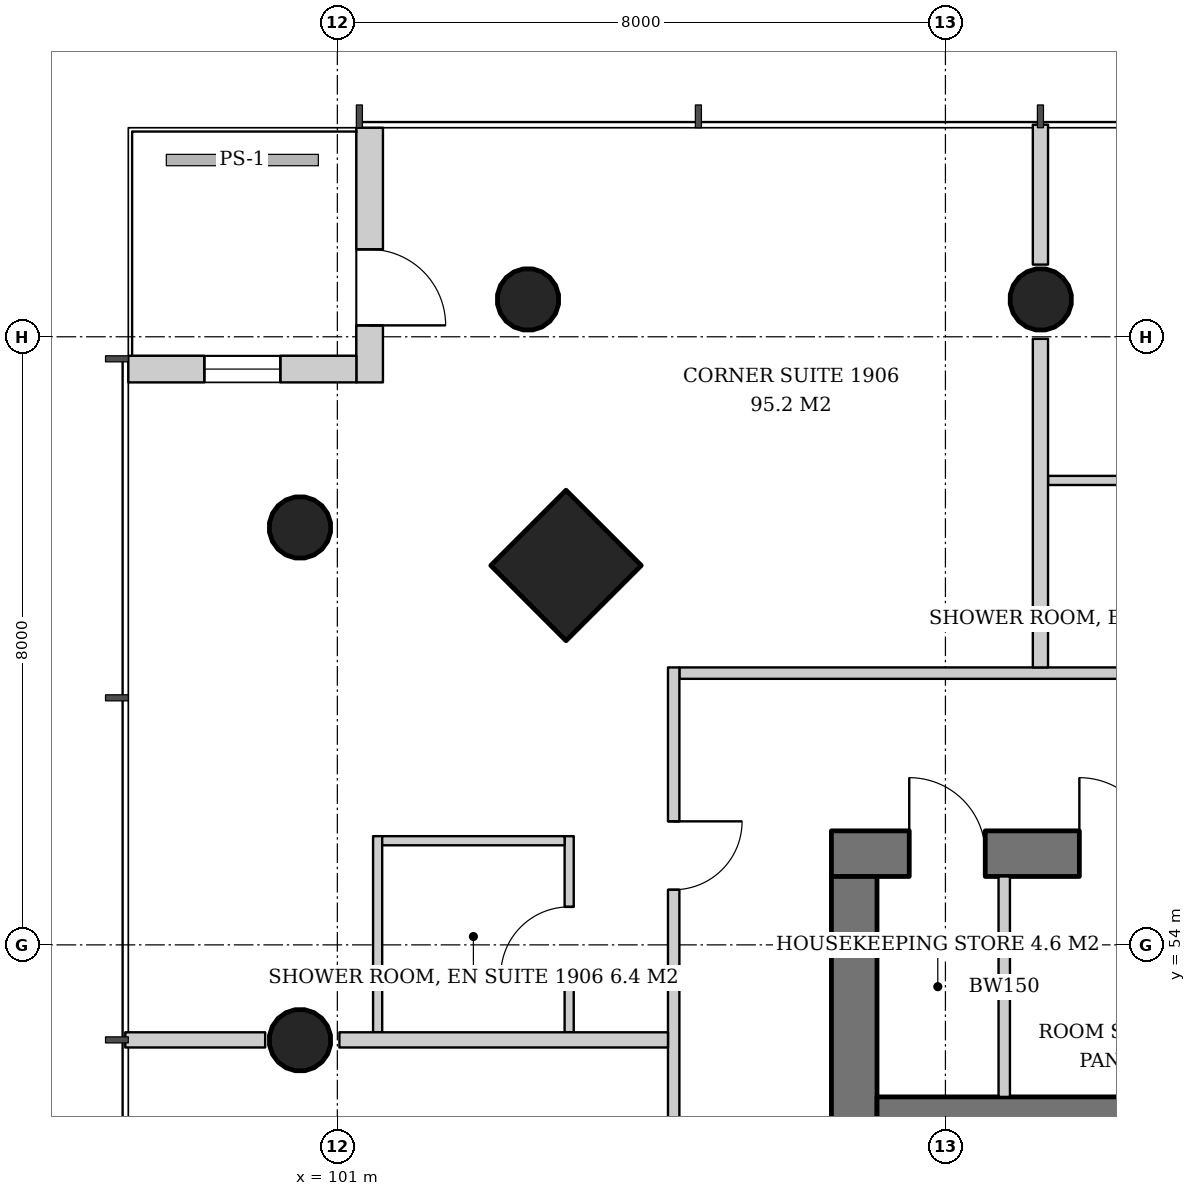
"""IFC4 building model, lengths in metres.
Left out: names, types, materials, properties, quantities, classifications, styles, units other than length and angle.
Written with IfcOpenShell. Run it as: python <this file> out.ifc"""

import sys

from ifc_helpers import new_model, si_unit, direction, frame, frame_2d, origin, origin_2d, place, context, subcontext, project, spatial, rectangle, hollow_circle, extrude, element, fill, save


model = new_model("IFC4")
c1 = context("Model", 3, precision=1e-05, world=origin(), true_north=direction((0.0, 1.0)))
c2 = subcontext(c1, "Body", "Model", "MODEL_VIEW")
j1 = project(units=[si_unit("LENGTHUNIT", "METRE"), si_unit("PLANEANGLEUNIT", "RADIAN")], contexts=[c1])
p1 = place(None, origin())
s1 = spatial("IfcSite", under=j1, at=p1, CompositionType="ELEMENT")
p2 = place(p1, origin())
s2 = spatial("IfcBuilding", under=s1, at=p2, CompositionType="ELEMENT")
p3 = place(p2, frame((0.0, 0.0, 78.0)))
s3 = spatial("IfcBuildingStorey", under=s2, at=p3, CompositionType="ELEMENT", Elevation=78.0)
p4 = place(p3, frame((103.957, 59.043, 0.0), z_axis=(0.043029647111, -0.043029647111, 0.998146732169), x_axis=(0.707106781187, 0.707106781187, 0.0)))
e1 = element("IfcColumn", 1, at=p4, inside=s3, PredefinedType="COLUMN", context=c2, shape_type="SweptSolid", body=[
    extrude(rectangle(XDim=1.4, YDim=1.4, at=origin_2d()), origin(), (0.0, 0.0, 1.0), 3.807),
])
p5 = place(p3, frame((103.457, 62.543, 0.0), z_axis=(0.043029647111, -0.043029647111, 0.998146732169), x_axis=(0.707106781187, 0.707106781187, 0.0)))
e2 = element("IfcColumn", 2, at=p5, inside=s3, PredefinedType="COLUMN", context=c2, shape_type="SweptSolid", body=[
    extrude(hollow_circle(Radius=0.406, WallThickness=0.03, at=origin_2d()), origin(), (0.0, 0.0, 1.0), 3.807),
])
p6 = place(p3, frame((110.229, 62.543, 0.0), z_axis=(0.021497706284, -0.043059584825, 0.998841188968), x_axis=(0.894693706707, 0.446680166538, 0.0)))
e3 = element("IfcColumn", 3, at=p6, inside=s3, PredefinedType="COLUMN", context=c2, shape_type="SweptSolid", body=[
    extrude(hollow_circle(Radius=0.406, WallThickness=0.03, at=origin_2d()), origin(), (0.0, 0.0, 1.0), 3.804),
])
p7 = place(p3, frame((100.457, 59.543, 0.0), z_axis=(0.043029647111, -0.043029647111, 0.998146732169), x_axis=(0.707106781187, 0.707106781187, 0.0)))
e4 = element("IfcColumn", 4, at=p7, inside=s3, PredefinedType="COLUMN", context=c2, shape_type="SweptSolid", body=[
    extrude(hollow_circle(Radius=0.406, WallThickness=0.03, at=origin_2d()), origin(), (0.0, 0.0, 1.0), 3.807),
])
p8 = place(p3, frame((100.457, 52.771, 0.0), z_axis=(0.043059584825, -0.021497706284, 0.998841188968), x_axis=(0.446680166538, 0.894693706707, 0.0)))
e5 = element("IfcColumn", 5, at=p8, inside=s3, PredefinedType="COLUMN", context=c2, shape_type="SweptSolid", body=[
    extrude(hollow_circle(Radius=0.406, WallThickness=0.03, at=origin_2d()), origin(), (0.0, 0.0, 1.0), 3.804),
])
p9 = place(p3, frame((107.5, 55.2, 0.0), z_axis=(0.0, 0.0, 1.0), x_axis=(1.0, 0.0, 0.0)))
e6 = element("IfcWall", 6, at=p9, inside=s3, PredefinedType="SHEAR", context=c2, shape_type="SweptSolid", body=[
    extrude(rectangle(XDim=19.0, YDim=0.6, at=frame_2d((9.5, 0.0))), origin(), (0.0, 0.0, 1.0), 3.8),
])
p10 = place(p9, frame((14.14, 0.0, 0.0)))
e7 = element("IfcOpeningElement", 7, at=p10, cuts=e6, PredefinedType="OPENING", context=c2, shape_type="SweptSolid", body=[
    extrude(rectangle(XDim=1.0, YDim=2.1, at=frame_2d((0.5, 1.05))), frame((0.0, 0.31, 0.0), z_axis=(0.0, -1.0, 0.0), x_axis=(1.0, 0.0, 0.0)), (0.0, 0.0, 1.0), 0.62),
])
p11 = place(p9, frame((1.024, 0.0, 0.0)))
e8 = element("IfcOpeningElement", 8, at=p11, cuts=e6, PredefinedType="OPENING", context=c2, shape_type="SweptSolid", body=[
    extrude(rectangle(XDim=1.0, YDim=2.1, at=frame_2d((0.5, 1.05))), frame((0.0, 0.31, 0.0), z_axis=(0.0, -1.0, 0.0), x_axis=(1.0, 0.0, 0.0)), (0.0, 0.0, 1.0), 0.62),
])
p12 = place(p9, frame((3.262, 0.0, 0.0)))
e9 = element("IfcOpeningElement", 9, at=p12, cuts=e6, PredefinedType="OPENING", context=c2, shape_type="SweptSolid", body=[
    extrude(rectangle(XDim=1.0, YDim=2.1, at=frame_2d((0.5, 1.05))), frame((0.0, 0.31, 0.0), z_axis=(0.0, -1.0, 0.0), x_axis=(1.0, 0.0, 0.0)), (0.0, 0.0, 1.0), 0.62),
])
p13 = place(p3, frame((107.8, 37.1, 0.0), z_axis=(0.0, 0.0, 1.0), x_axis=(0.0, 1.0, 0.0)))
e10 = element("IfcWall", 10, at=p13, inside=s3, PredefinedType="SHEAR", context=c2, shape_type="SweptSolid", body=[
    extrude(rectangle(XDim=17.8, YDim=0.6, at=frame_2d((8.9, 0.0))), origin(), (0.0, 0.0, 1.0), 3.8),
])
p14 = place(p13, frame((8.0, 0.0, 0.0)))
e11 = element("IfcOpeningElement", 11, at=p14, cuts=e10, PredefinedType="OPENING", context=c2, shape_type="SweptSolid", body=[
    extrude(rectangle(XDim=1.8, YDim=2.4, at=frame_2d((0.9, 1.2))), frame((0.0, 0.31, 0.0), z_axis=(0.0, -1.0, 0.0), x_axis=(1.0, 0.0, 0.0)), (0.0, 0.0, 1.0), 0.62),
])
p15 = place(p3, frame((108.1, 51.8, 0.0), z_axis=(0.0, 0.0, 1.0), x_axis=(1.0, 0.0, 0.0)))
e12 = element("IfcWall", 12, at=p15, inside=s3, PredefinedType="SHEAR", context=c2, shape_type="SweptSolid", body=[
    extrude(rectangle(XDim=17.8, YDim=0.4, at=frame_2d((8.9, 0.0))), origin(), (0.0, 0.0, 1.0), 3.8),
])
p16 = place(p3, frame((101.425, 64.75, 0.0), z_axis=(0.0, 0.0, 1.0), x_axis=(0.0, -1.0, 0.0)))
e13 = element("IfcWall", 13, at=p16, inside=s3, PredefinedType="SOLIDWALL", context=c2, shape_type="SweptSolid", body=[
    extrude(rectangle(XDim=3.35, YDim=0.35, at=frame_2d((1.675, 0.0))), origin(), (0.0, 0.0, 1.0), 3.52),
])
p17 = place(p16, frame((1.6, 0.0, 0.0)))
e14 = element("IfcOpeningElement", 14, at=p17, cuts=e13, PredefinedType="OPENING", context=c2, shape_type="SweptSolid", body=[
    extrude(rectangle(XDim=1.0, YDim=2.4, at=frame_2d((0.5, 1.2))), frame((0.0, 0.185, 0.0), z_axis=(0.0, -1.0, 0.0), x_axis=(1.0, 0.0, 0.0)), (0.0, 0.0, 1.0), 0.37),
])
p18 = place(p3, frame((101.25, 61.575, 0.0), z_axis=(0.0, 0.0, 1.0), x_axis=(-1.0, 0.0, 0.0)))
e15 = element("IfcWall", 15, at=p18, inside=s3, PredefinedType="SOLIDWALL", context=c2, shape_type="SweptSolid", body=[
    extrude(rectangle(XDim=3.0, YDim=0.35, at=frame_2d((1.5, 0.0))), origin(), (0.0, 0.0, 1.0), 3.52),
])
p19 = place(p18, frame((1.0, 0.0, 0.82)))
e16 = element("IfcOpeningElement", 16, at=p19, cuts=e15, PredefinedType="OPENING", context=c2, shape_type="SweptSolid", body=[
    extrude(rectangle(XDim=1.0, YDim=2.4, at=frame_2d((0.5, 1.2))), frame((0.0, 0.185, 0.0), z_axis=(0.0, -1.0, 0.0), x_axis=(1.0, 0.0, 0.0)), (0.0, 0.0, 1.0), 0.37),
])
p20 = place(p3, frame((109.774, 52.0, 0.0), z_axis=(0.0, 0.0, 1.0), x_axis=(0.0, 1.0, 0.0)))
e17 = element("IfcWall", 17, at=p20, inside=s3, PredefinedType="SOLIDWALL", context=c2, shape_type="SweptSolid", body=[
    extrude(rectangle(XDim=2.9, YDim=0.15, at=frame_2d((1.45, 0.0))), origin(), (0.0, 0.0, 1.0), 3.52),
])
p21 = place(p3, frame((112.77, 60.11, 0.0), z_axis=(0.0, 0.0, 1.0), x_axis=(-1.0, 0.0, 0.0)))
e18 = element("IfcWall", 18, at=p21, inside=s3, PredefinedType="PARTITIONING", context=c2, shape_type="SweptSolid", body=[
    extrude(rectangle(XDim=2.42, YDim=0.12, at=frame_2d((1.21, 0.0))), origin(), (0.0, 0.0, 1.0), 3.52),
])
p22 = place(p3, frame((128.65, 57.575, 0.0), z_axis=(0.0, 0.0, 1.0), x_axis=(-1.0, 0.0, 0.0)))
e19 = element("IfcWall", 19, at=p22, inside=s3, PredefinedType="PARTITIONING", context=c2, shape_type="SweptSolid", body=[
    extrude(rectangle(XDim=23.15, YDim=0.15, at=frame_2d((11.575, 0.0))), origin(), (0.0, 0.0, 1.0), 2.72),
])
p23 = place(p22, frame((2.025, 0.0, 0.0)))
e20 = element("IfcOpeningElement", 20, at=p23, cuts=e19, PredefinedType="OPENING", context=c2, shape_type="SweptSolid", body=[
    extrude(rectangle(XDim=0.9, YDim=2.1, at=frame_2d((0.45, 1.05))), frame((0.0, 0.085, 0.0), z_axis=(0.0, -1.0, 0.0), x_axis=(1.0, 0.0, 0.0)), (0.0, 0.0, 1.0), 0.17),
])
p24 = place(p22, frame((7.65, 0.0, 0.0)))
e21 = element("IfcOpeningElement", 21, at=p24, cuts=e19, PredefinedType="OPENING", context=c2, shape_type="SweptSolid", body=[
    extrude(rectangle(XDim=0.9, YDim=2.1, at=frame_2d((0.45, 1.05))), frame((0.0, 0.085, 0.0), z_axis=(0.0, -1.0, 0.0), x_axis=(1.0, 0.0, 0.0)), (0.0, 0.0, 1.0), 0.17),
])
p25 = place(p22, frame((14.75, 0.0, 0.0)))
e22 = element("IfcOpeningElement", 22, at=p25, cuts=e19, PredefinedType="OPENING", context=c2, shape_type="SweptSolid", body=[
    extrude(rectangle(XDim=0.9, YDim=2.1, at=frame_2d((0.45, 1.05))), frame((0.0, 0.085, 0.0), z_axis=(0.0, -1.0, 0.0), x_axis=(1.0, 0.0, 0.0)), (0.0, 0.0, 1.0), 0.17),
])
p26 = place(p3, frame((110.25, 57.65, 0.0), z_axis=(0.0, 0.0, 1.0), x_axis=(0.0, 1.0, 0.0)))
e23 = element("IfcWall", 23, at=p26, inside=s3, PredefinedType="PARTITIONING", context=c2, shape_type="SweptSolid", body=[
    extrude(rectangle(XDim=4.323, YDim=0.2, at=frame_2d((2.162, 0.0))), origin(), (0.0, 0.0, 1.0), 3.52),
])
p27 = place(p3, frame((110.25, 62.95, 0.0), z_axis=(0.0, 0.0, 1.0), x_axis=(0.0, 1.0, 0.0)))
e24 = element("IfcWall", 24, at=p27, inside=s3, PredefinedType="PARTITIONING", context=c2, shape_type="SweptSolid", body=[
    extrude(rectangle(XDim=1.84, YDim=0.2, at=frame_2d((0.92, 0.0))), origin(), (0.0, 0.0, 1.0), 3.52),
])
p28 = place(p3, frame((104.05, 52.85, 0.0), z_axis=(0.0, 0.0, 1.0), x_axis=(0.0, 1.0, 0.0)))
e25 = element("IfcWall", 25, at=p28, inside=s3, PredefinedType="PARTITIONING", context=c2, shape_type="SweptSolid", body=[
    extrude(rectangle(XDim=2.58, YDim=0.12, at=frame_2d((1.29, 0.0))), origin(), (0.0, 0.0, 1.0), 2.82),
])
p29 = place(p28, frame((0.75, 0.0, 0.0)))
e26 = element("IfcOpeningElement", 26, at=p29, cuts=e25, PredefinedType="OPENING", context=c2, shape_type="SweptSolid", body=[
    extrude(rectangle(XDim=0.9, YDim=2.1, at=frame_2d((0.45, 1.05))), frame((0.0, 0.07, 0.0), z_axis=(0.0, -1.0, 0.0), x_axis=(1.0, 0.0, 0.0)), (0.0, 0.0, 1.0), 0.14),
])
p30 = place(p3, frame((101.53, 52.85, 0.0), z_axis=(0.0, 0.0, 1.0), x_axis=(0.0, 1.0, 0.0)))
e27 = element("IfcWall", 27, at=p30, inside=s3, PredefinedType="PARTITIONING", context=c2, shape_type="SweptSolid", body=[
    extrude(rectangle(XDim=2.58, YDim=0.12, at=frame_2d((1.29, 0.0))), origin(), (0.0, 0.0, 1.0), 2.82),
])
p31 = place(p3, frame((103.99, 55.37, 0.0), z_axis=(0.0, 0.0, 1.0), x_axis=(-1.0, 0.0, 0.0)))
e28 = element("IfcWall", 28, at=p31, inside=s3, PredefinedType="PARTITIONING", context=c2, shape_type="SweptSolid", body=[
    extrude(rectangle(XDim=2.4, YDim=0.12, at=frame_2d((1.2, 0.0))), origin(), (0.0, 0.0, 1.0), 2.82),
])
p32 = place(p3, frame((105.425, 57.65, 0.0), z_axis=(0.0, 0.0, 1.0), x_axis=(0.0, -1.0, 0.0)))
e29 = element("IfcWall", 29, at=p32, inside=s3, PredefinedType="PARTITIONING", context=c2, shape_type="SweptSolid", body=[
    extrude(rectangle(XDim=23.15, YDim=0.15, at=frame_2d((11.575, 0.0))), origin(), (0.0, 0.0, 1.0), 2.72),
])
p33 = place(p32, frame((2.025, 0.0, 0.0)))
e30 = element("IfcOpeningElement", 30, at=p33, cuts=e29, PredefinedType="OPENING", context=c2, shape_type="SweptSolid", body=[
    extrude(rectangle(XDim=0.9, YDim=2.1, at=frame_2d((0.45, 1.05))), frame((0.0, 0.085, 0.0), z_axis=(0.0, -1.0, 0.0), x_axis=(1.0, 0.0, 0.0)), (0.0, 0.0, 1.0), 0.17),
])
p34 = place(p32, frame((7.6, 0.0, 0.0)))
e31 = element("IfcOpeningElement", 31, at=p34, cuts=e29, PredefinedType="OPENING", context=c2, shape_type="SweptSolid", body=[
    extrude(rectangle(XDim=1.0, YDim=2.1, at=frame_2d((0.5, 1.05))), frame((0.0, 0.085, 0.0), z_axis=(0.0, -1.0, 0.0), x_axis=(1.0, 0.0, 0.0)), (0.0, 0.0, 1.0), 0.17),
])
p35 = place(p32, frame((10.25, 0.0, 0.0)))
e32 = element("IfcOpeningElement", 32, at=p35, cuts=e29, PredefinedType="OPENING", context=c2, shape_type="SweptSolid", body=[
    extrude(rectangle(XDim=0.9, YDim=2.1, at=frame_2d((0.45, 1.05))), frame((0.0, 0.085, 0.0), z_axis=(0.0, -1.0, 0.0), x_axis=(1.0, 0.0, 0.0)), (0.0, 0.0, 1.0), 0.17),
])
p36 = place(p32, frame((16.65, 0.0, 0.0)))
e33 = element("IfcOpeningElement", 33, at=p36, cuts=e29, PredefinedType="OPENING", context=c2, shape_type="SweptSolid", body=[
    extrude(rectangle(XDim=0.9, YDim=2.1, at=frame_2d((0.45, 1.05))), frame((0.0, 0.085, 0.0), z_axis=(0.0, -1.0, 0.0), x_axis=(1.0, 0.0, 0.0)), (0.0, 0.0, 1.0), 0.17),
])
p37 = place(p3, frame((105.35, 52.75, 0.0), z_axis=(0.0, 0.0, 1.0), x_axis=(-1.0, 0.0, 0.0)))
e34 = element("IfcWall", 34, at=p37, inside=s3, PredefinedType="PARTITIONING", context=c2, shape_type="SweptSolid", body=[
    extrude(rectangle(XDim=4.323, YDim=0.2, at=frame_2d((2.162, 0.0))), origin(), (0.0, 0.0, 1.0), 3.52),
])
p38 = place(p3, frame((100.05, 52.75, 0.0), z_axis=(0.0, 0.0, 1.0), x_axis=(-1.0, 0.0, 0.0)))
e35 = element("IfcWall", 35, at=p38, inside=s3, PredefinedType="PARTITIONING", context=c2, shape_type="SweptSolid", body=[
    extrude(rectangle(XDim=1.84, YDim=0.2, at=frame_2d((0.92, 0.0))), origin(), (0.0, 0.0, 1.0), 3.52),
])
p39 = place(p17, origin())
e36 = element("IfcDoor", 36, at=p39, inside=s3, OperationType="SINGLE_SWING_RIGHT", PredefinedType="DOOR", context=c2, shape_type="SweptSolid", body=[
    extrude(rectangle(XDim=1.0, YDim=2.4, at=frame_2d((0.5, 1.2))), frame((0.0, 0.025, 0.0), z_axis=(0.0, -1.0, 0.0), x_axis=(1.0, 0.0, 0.0)), (0.0, 0.0, 1.0), 0.05),
])
fill(e14, e36)
p40 = place(p19, origin())
e37 = element("IfcWindow", 37, at=p40, inside=s3, PartitioningType="SINGLE_PANEL", PredefinedType="WINDOW", context=c2, shape_type="SweptSolid", body=[
    extrude(rectangle(XDim=1.0, YDim=2.4, at=frame_2d((0.5, 1.2))), frame((0.0, 0.03, 0.0), z_axis=(0.0, -1.0, 0.0), x_axis=(1.0, 0.0, 0.0)), (0.0, 0.0, 1.0), 0.06),
])
fill(e16, e37)
p41 = place(p11, origin())
e38 = element("IfcDoor", 38, at=p41, inside=s3, OperationType="SINGLE_SWING_LEFT", PredefinedType="DOOR", context=c2, shape_type="SweptSolid", body=[
    extrude(rectangle(XDim=1.0, YDim=2.1, at=frame_2d((0.5, 1.05))), frame((0.0, -0.24, 0.0), z_axis=(0.0, -1.0, 0.0), x_axis=(1.0, 0.0, 0.0)), (0.0, 0.0, 1.0), 0.05),
])
fill(e8, e38)
p42 = place(p12, origin())
e39 = element("IfcDoor", 39, at=p42, inside=s3, OperationType="SINGLE_SWING_LEFT", PredefinedType="DOOR", context=c2, shape_type="SweptSolid", body=[
    extrude(rectangle(XDim=1.0, YDim=2.1, at=frame_2d((0.5, 1.05))), frame((0.0, -0.24, 0.0), z_axis=(0.0, -1.0, 0.0), x_axis=(1.0, 0.0, 0.0)), (0.0, 0.0, 1.0), 0.05),
])
fill(e9, e39)
p43 = place(p29, origin())
e40 = element("IfcDoor", 40, at=p43, inside=s3, OperationType="SINGLE_SWING_LEFT", PredefinedType="DOOR", context=c2, shape_type="SweptSolid", body=[
    extrude(rectangle(XDim=0.9, YDim=2.1, at=frame_2d((0.45, 1.05))), frame((0.0, 0.025, 0.0), z_axis=(0.0, -1.0, 0.0), x_axis=(1.0, 0.0, 0.0)), (0.0, 0.0, 1.0), 0.05),
])
fill(e26, e40)
p44 = place(p33, origin())
e41 = element("IfcDoor", 41, at=p44, inside=s3, OperationType="SINGLE_SWING_LEFT", PredefinedType="DOOR", context=c2, shape_type="SweptSolid", body=[
    extrude(rectangle(XDim=0.9, YDim=2.1, at=frame_2d((0.45, 1.05))), frame((0.0, 0.025, 0.0), z_axis=(0.0, -1.0, 0.0), x_axis=(1.0, 0.0, 0.0)), (0.0, 0.0, 1.0), 0.05),
])
fill(e30, e41)
save(model, sys.argv[1])
